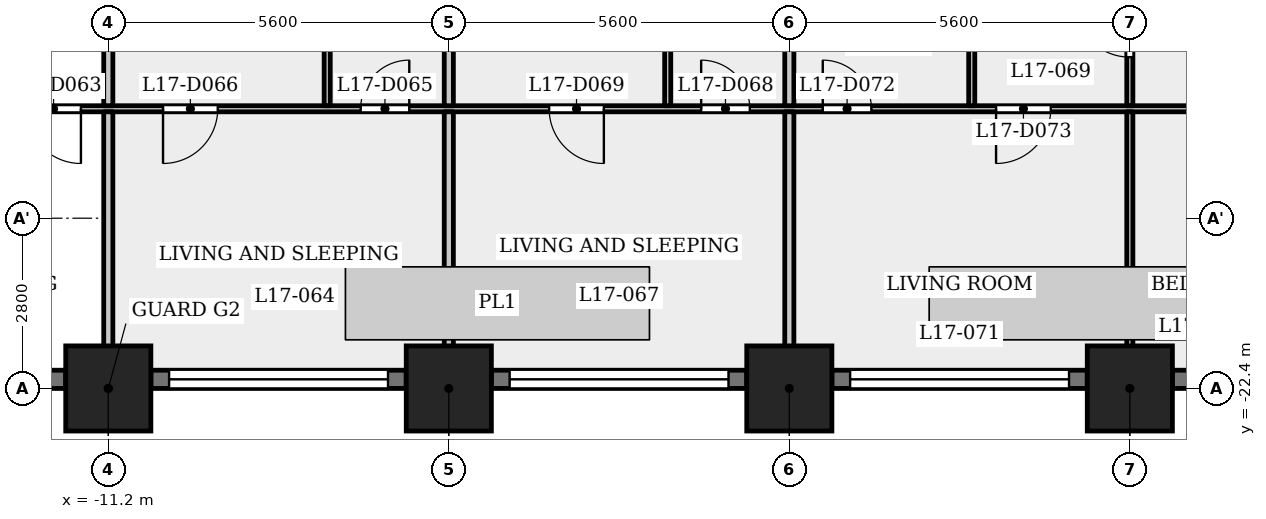
"""IFC4 building model, lengths in metres.
Left out: names, types, materials, properties, quantities, classifications, styles, units other than length and angle.
Written with IfcOpenShell. Run it as: python <this file> out.ifc"""

import sys

from ifc_helpers import new_model, si_unit, direction, frame, frame_2d, origin, origin_2d, place, context, subcontext, project, spatial, rectangle, extrude, element, fill, save


model = new_model("IFC4")
c1 = context("Model", 3, precision=1e-05, world=origin(), true_north=direction((0.0, 1.0)))
c2 = subcontext(c1, "Body", "Model", "MODEL_VIEW")
j1 = project(units=[si_unit("LENGTHUNIT", "METRE"), si_unit("PLANEANGLEUNIT", "RADIAN")], contexts=[c1])
p1 = place(None, origin())
s1 = spatial("IfcSite", under=j1, at=p1, CompositionType="ELEMENT")
p2 = place(p1, origin())
s2 = spatial("IfcBuilding", under=s1, at=p2, CompositionType="ELEMENT")
p3 = place(p2, frame((0.0, 0.0, 69.0)))
s3 = spatial("IfcBuildingStorey", under=s2, at=p3, CompositionType="ELEMENT", Elevation=69.0)
for number, where, z_axis, x_axis in (
    (1, (-11.2, -22.4, 0.0), (0.0, 0.0, 1.0), (1.0, 0.0, 0.0)),
    (2, (-5.6, -22.4, 0.0), (0.0, 0.0, 1.0), (1.0, 0.0, 0.0)),
    (3, (0.0, -22.4, 0.0), (0.0, 0.0, 1.0), (1.0, 0.0, 0.0)),
    (4, (5.6, -22.4, 0.0), (0.0, 0.0, 1.0), (1.0, 0.0, 0.0)),
):
    element("IfcColumn", number, at=place(p3, frame(where, z_axis=z_axis, x_axis=x_axis)), inside=s3, PredefinedType="COLUMN", context=c2, shape_type="SweptSolid", body=[
        extrude(rectangle(XDim=1.4, YDim=1.4, at=origin_2d()), origin(), (0.0, 0.0, 1.0), 3.5),
    ])
p4 = place(p3, frame((-16.1, -22.25, 0.0), z_axis=(0.0, 0.0, 1.0), x_axis=(1.0, 0.0, 0.0)))
e5 = element("IfcWall", 5, at=p4, inside=s3, PredefinedType="SOLIDWALL", context=c2, shape_type="SweptSolid", body=[
    extrude(rectangle(XDim=4.2, YDim=0.3, at=frame_2d((2.1, 0.0))), origin(), (0.0, 0.0, 1.0), 2.3),
])
p5 = place(p4, frame((0.3, 0.0, 1.2)))
e6 = element("IfcOpeningElement", 6, at=p5, cuts=e5, PredefinedType="OPENING", context=c2, shape_type="SweptSolid", body=[
    extrude(rectangle(XDim=3.6, YDim=0.95, at=frame_2d((1.8, 0.475))), frame((0.0, 0.16, 0.0), z_axis=(0.0, -1.0, 0.0), x_axis=(1.0, 0.0, 0.0)), (0.0, 0.0, 1.0), 0.32),
])
p6 = place(p3, frame((-10.5, -22.25, 0.0), z_axis=(0.0, 0.0, 1.0), x_axis=(1.0, 0.0, 0.0)))
e7 = element("IfcWall", 7, at=p6, inside=s3, PredefinedType="SOLIDWALL", context=c2, shape_type="SweptSolid", body=[
    extrude(rectangle(XDim=4.2, YDim=0.3, at=frame_2d((2.1, 0.0))), origin(), (0.0, 0.0, 1.0), 2.3),
])
p7 = place(p6, frame((0.3, 0.0, 1.2)))
e8 = element("IfcOpeningElement", 8, at=p7, cuts=e7, PredefinedType="OPENING", context=c2, shape_type="SweptSolid", body=[
    extrude(rectangle(XDim=3.6, YDim=0.95, at=frame_2d((1.8, 0.475))), frame((0.0, 0.16, 0.0), z_axis=(0.0, -1.0, 0.0), x_axis=(1.0, 0.0, 0.0)), (0.0, 0.0, 1.0), 0.32),
])
p8 = place(p3, frame((-4.9, -22.25, 0.0), z_axis=(0.0, 0.0, 1.0), x_axis=(1.0, 0.0, 0.0)))
e9 = element("IfcWall", 9, at=p8, inside=s3, PredefinedType="SOLIDWALL", context=c2, shape_type="SweptSolid", body=[
    extrude(rectangle(XDim=4.2, YDim=0.3, at=frame_2d((2.1, 0.0))), origin(), (0.0, 0.0, 1.0), 2.3),
])
p9 = place(p8, frame((0.3, 0.0, 1.2)))
e10 = element("IfcOpeningElement", 10, at=p9, cuts=e9, PredefinedType="OPENING", context=c2, shape_type="SweptSolid", body=[
    extrude(rectangle(XDim=3.6, YDim=0.95, at=frame_2d((1.8, 0.475))), frame((0.0, 0.16, 0.0), z_axis=(0.0, -1.0, 0.0), x_axis=(1.0, 0.0, 0.0)), (0.0, 0.0, 1.0), 0.32),
])
p10 = place(p3, frame((0.7, -22.25, 0.0), z_axis=(0.0, 0.0, 1.0), x_axis=(1.0, 0.0, 0.0)))
e11 = element("IfcWall", 11, at=p10, inside=s3, PredefinedType="SOLIDWALL", context=c2, shape_type="SweptSolid", body=[
    extrude(rectangle(XDim=4.2, YDim=0.3, at=frame_2d((2.1, 0.0))), origin(), (0.0, 0.0, 1.0), 2.3),
])
p11 = place(p10, frame((0.3, 0.0, 1.2)))
e12 = element("IfcOpeningElement", 12, at=p11, cuts=e11, PredefinedType="OPENING", context=c2, shape_type="SweptSolid", body=[
    extrude(rectangle(XDim=3.6, YDim=0.95, at=frame_2d((1.8, 0.475))), frame((0.0, 0.16, 0.0), z_axis=(0.0, -1.0, 0.0), x_axis=(1.0, 0.0, 0.0)), (0.0, 0.0, 1.0), 0.32),
])
p12 = place(p3, frame((6.3, -22.25, 0.0), z_axis=(0.0, 0.0, 1.0), x_axis=(1.0, 0.0, 0.0)))
e13 = element("IfcWall", 13, at=p12, inside=s3, PredefinedType="SOLIDWALL", context=c2, shape_type="SweptSolid", body=[
    extrude(rectangle(XDim=4.2, YDim=0.3, at=frame_2d((2.1, 0.0))), origin(), (0.0, 0.0, 1.0), 2.3),
])
p13 = place(p12, frame((0.413, 0.0, 0.6)))
e14 = element("IfcOpeningElement", 14, at=p13, cuts=e13, PredefinedType="OPENING", context=c2, shape_type="SweptSolid", body=[
    extrude(rectangle(XDim=1.2, YDim=1.55, at=frame_2d((0.6, 0.775))), frame((0.0, 0.16, 0.0), z_axis=(0.0, -1.0, 0.0), x_axis=(1.0, 0.0, 0.0)), (0.0, 0.0, 1.0), 0.32),
])
p14 = place(p12, frame((2.587, 0.0, 0.6)))
e15 = element("IfcOpeningElement", 15, at=p14, cuts=e13, PredefinedType="OPENING", context=c2, shape_type="SweptSolid", body=[
    extrude(rectangle(XDim=1.2, YDim=1.55, at=frame_2d((0.6, 0.775))), frame((0.0, 0.16, 0.0), z_axis=(0.0, -1.0, 0.0), x_axis=(1.0, 0.0, 0.0)), (0.0, 0.0, 1.0), 0.32),
])
p15 = place(p3, frame((-26.394, -17.8, 0.0), z_axis=(0.0, 0.0, 1.0), x_axis=(1.0, 0.0, 0.0)))
e16 = element("IfcWall", 16, at=p15, inside=s3, PredefinedType="PARTITIONING", context=c2, shape_type="SweptSolid", body=[
    extrude(rectangle(XDim=53.034, YDim=0.1, at=frame_2d((26.517, 0.0))), origin(), (0.0, 0.0, 1.0), 3.15),
])
p16 = place(p15, frame((0.794, 0.0, 0.0)))
e17 = element("IfcOpeningElement", 17, at=p16, cuts=e16, PredefinedType="OPENING", context=c2, shape_type="SweptSolid", body=[
    extrude(rectangle(XDim=0.8, YDim=2.1, at=frame_2d((0.4, 1.05))), frame((0.0, 0.06, 0.0), z_axis=(0.0, -1.0, 0.0), x_axis=(1.0, 0.0, 0.0)), (0.0, 0.0, 1.0), 0.12),
])
p17 = place(p15, frame((5.644, 0.0, 0.0)))
e18 = element("IfcOpeningElement", 18, at=p17, cuts=e16, PredefinedType="OPENING", context=c2, shape_type="SweptSolid", body=[
    extrude(rectangle(XDim=0.9, YDim=2.1, at=frame_2d((0.45, 1.05))), frame((0.0, 0.06, 0.0), z_axis=(0.0, -1.0, 0.0), x_axis=(1.0, 0.0, 0.0)), (0.0, 0.0, 1.0), 0.12),
])
p18 = place(p15, frame((10.494, 0.0, 0.0)))
e19 = element("IfcOpeningElement", 19, at=p18, cuts=e16, PredefinedType="OPENING", context=c2, shape_type="SweptSolid", body=[
    extrude(rectangle(XDim=0.8, YDim=2.1, at=frame_2d((0.4, 1.05))), frame((0.0, 0.06, 0.0), z_axis=(0.0, -1.0, 0.0), x_axis=(1.0, 0.0, 0.0)), (0.0, 0.0, 1.0), 0.12),
])
p19 = place(p15, frame((13.844, 0.0, 0.0)))
e20 = element("IfcOpeningElement", 20, at=p19, cuts=e16, PredefinedType="OPENING", context=c2, shape_type="SweptSolid", body=[
    extrude(rectangle(XDim=0.9, YDim=2.1, at=frame_2d((0.45, 1.05))), frame((0.0, 0.06, 0.0), z_axis=(0.0, -1.0, 0.0), x_axis=(1.0, 0.0, 0.0)), (0.0, 0.0, 1.0), 0.12),
])
p20 = place(p15, frame((19.344, 0.0, 0.0)))
e21 = element("IfcOpeningElement", 21, at=p20, cuts=e16, PredefinedType="OPENING", context=c2, shape_type="SweptSolid", body=[
    extrude(rectangle(XDim=0.8, YDim=2.1, at=frame_2d((0.4, 1.05))), frame((0.0, 0.06, 0.0), z_axis=(0.0, -1.0, 0.0), x_axis=(1.0, 0.0, 0.0)), (0.0, 0.0, 1.0), 0.12),
])
p21 = place(p15, frame((16.094, 0.0, 0.0)))
e22 = element("IfcOpeningElement", 22, at=p21, cuts=e16, PredefinedType="OPENING", context=c2, shape_type="SweptSolid", body=[
    extrude(rectangle(XDim=0.9, YDim=2.1, at=frame_2d((0.45, 1.05))), frame((0.0, 0.06, 0.0), z_axis=(0.0, -1.0, 0.0), x_axis=(1.0, 0.0, 0.0)), (0.0, 0.0, 1.0), 0.12),
])
p22 = place(p15, frame((24.944, 0.0, 0.0)))
e23 = element("IfcOpeningElement", 23, at=p22, cuts=e16, PredefinedType="OPENING", context=c2, shape_type="SweptSolid", body=[
    extrude(rectangle(XDim=0.8, YDim=2.1, at=frame_2d((0.4, 1.05))), frame((0.0, 0.06, 0.0), z_axis=(0.0, -1.0, 0.0), x_axis=(1.0, 0.0, 0.0)), (0.0, 0.0, 1.0), 0.12),
])
p23 = place(p15, frame((22.444, 0.0, 0.0)))
e24 = element("IfcOpeningElement", 24, at=p23, cuts=e16, PredefinedType="OPENING", context=c2, shape_type="SweptSolid", body=[
    extrude(rectangle(XDim=0.9, YDim=2.1, at=frame_2d((0.45, 1.05))), frame((0.0, 0.06, 0.0), z_axis=(0.0, -1.0, 0.0), x_axis=(1.0, 0.0, 0.0)), (0.0, 0.0, 1.0), 0.12),
])
p24 = place(p15, frame((26.944, 0.0, 0.0)))
e25 = element("IfcOpeningElement", 25, at=p24, cuts=e16, PredefinedType="OPENING", context=c2, shape_type="SweptSolid", body=[
    extrude(rectangle(XDim=0.8, YDim=2.1, at=frame_2d((0.4, 1.05))), frame((0.0, 0.06, 0.0), z_axis=(0.0, -1.0, 0.0), x_axis=(1.0, 0.0, 0.0)), (0.0, 0.0, 1.0), 0.12),
])
p25 = place(p15, frame((29.794, 0.0, 0.0)))
e26 = element("IfcOpeningElement", 26, at=p25, cuts=e16, PredefinedType="OPENING", context=c2, shape_type="SweptSolid", body=[
    extrude(rectangle(XDim=0.9, YDim=2.1, at=frame_2d((0.45, 1.05))), frame((0.0, 0.06, 0.0), z_axis=(0.0, -1.0, 0.0), x_axis=(1.0, 0.0, 0.0)), (0.0, 0.0, 1.0), 0.12),
])
p26 = place(p15, frame((33.394, 0.0, 0.0)))
e27 = element("IfcOpeningElement", 27, at=p26, cuts=e16, PredefinedType="OPENING", context=c2, shape_type="SweptSolid", body=[
    extrude(rectangle(XDim=0.9, YDim=2.1, at=frame_2d((0.45, 1.05))), frame((0.0, 0.06, 0.0), z_axis=(0.0, -1.0, 0.0), x_axis=(1.0, 0.0, 0.0)), (0.0, 0.0, 1.0), 0.12),
])
p27 = place(p15, frame((34.944, 0.0, 0.0)))
e28 = element("IfcOpeningElement", 28, at=p27, cuts=e16, PredefinedType="OPENING", context=c2, shape_type="SweptSolid", body=[
    extrude(rectangle(XDim=0.9, YDim=2.1, at=frame_2d((0.45, 1.05))), frame((0.0, 0.06, 0.0), z_axis=(0.0, -1.0, 0.0), x_axis=(1.0, 0.0, 0.0)), (0.0, 0.0, 1.0), 0.12),
])
p28 = place(p15, frame((38.144, 0.0, 0.0)))
e29 = element("IfcOpeningElement", 29, at=p28, cuts=e16, PredefinedType="OPENING", context=c2, shape_type="SweptSolid", body=[
    extrude(rectangle(XDim=0.8, YDim=2.1, at=frame_2d((0.4, 1.05))), frame((0.0, 0.06, 0.0), z_axis=(0.0, -1.0, 0.0), x_axis=(1.0, 0.0, 0.0)), (0.0, 0.0, 1.0), 0.12),
])
p29 = place(p15, frame((40.244, 0.0, 0.0)))
e30 = element("IfcOpeningElement", 30, at=p29, cuts=e16, PredefinedType="OPENING", context=c2, shape_type="SweptSolid", body=[
    extrude(rectangle(XDim=0.9, YDim=2.1, at=frame_2d((0.45, 1.05))), frame((0.0, 0.06, 0.0), z_axis=(0.0, -1.0, 0.0), x_axis=(1.0, 0.0, 0.0)), (0.0, 0.0, 1.0), 0.12),
])
p30 = place(p15, frame((49.362, 0.0, 0.0)))
e31 = element("IfcOpeningElement", 31, at=p30, cuts=e16, PredefinedType="OPENING", context=c2, shape_type="SweptSolid", body=[
    extrude(rectangle(XDim=0.8, YDim=2.1, at=frame_2d((0.4, 1.05))), frame((0.0, 0.06, 0.0), z_axis=(0.0, -1.0, 0.0), x_axis=(1.0, 0.0, 0.0)), (0.0, 0.0, 1.0), 0.12),
])
p31 = place(p15, frame((45.094, 0.0, 0.0)))
e32 = element("IfcOpeningElement", 32, at=p31, cuts=e16, PredefinedType="OPENING", context=c2, shape_type="SweptSolid", body=[
    extrude(rectangle(XDim=0.9, YDim=2.1, at=frame_2d((0.45, 1.05))), frame((0.0, 0.06, 0.0), z_axis=(0.0, -1.0, 0.0), x_axis=(1.0, 0.0, 0.0)), (0.0, 0.0, 1.0), 0.12),
])
p32 = place(p3, frame((-11.2, -23.08, 0.0), z_axis=(0.0, 0.0, 1.0), x_axis=(0.0, 1.0, 0.0)))
e33 = element("IfcWall", 33, at=p32, inside=s3, PredefinedType="PARTITIONING", context=c2, shape_type="SweptSolid", body=[
    extrude(rectangle(XDim=5.23, YDim=0.15, at=frame_2d((2.615, 0.0))), origin(), (0.0, 0.0, 1.0), 3.15),
])
p33 = place(p3, frame((-11.2, -17.75, 0.0), z_axis=(0.0, 0.0, 1.0), x_axis=(0.0, 1.0, 0.0)))
e34 = element("IfcWall", 34, at=p33, inside=s3, PredefinedType="PARTITIONING", context=c2, shape_type="SweptSolid", body=[
    extrude(rectangle(XDim=2.275, YDim=0.15, at=frame_2d((1.137, 0.0))), origin(), (0.0, 0.0, 1.0), 3.15),
])
p34 = place(p3, frame((-7.6, -17.75, 0.0), z_axis=(0.0, 0.0, 1.0), x_axis=(0.0, 1.0, 0.0)))
e35 = element("IfcWall", 35, at=p34, inside=s3, PredefinedType="PARTITIONING", context=c2, shape_type="SweptSolid", body=[
    extrude(rectangle(XDim=2.275, YDim=0.1, at=frame_2d((1.137, 0.0))), origin(), (0.0, 0.0, 1.0), 3.15),
])
p35 = place(p3, frame((-5.6, -23.08, 0.0), z_axis=(0.0, 0.0, 1.0), x_axis=(0.0, 1.0, 0.0)))
e36 = element("IfcWall", 36, at=p35, inside=s3, PredefinedType="PARTITIONING", context=c2, shape_type="SweptSolid", body=[
    extrude(rectangle(XDim=5.23, YDim=0.15, at=frame_2d((2.615, 0.0))), origin(), (0.0, 0.0, 1.0), 3.15),
])
p36 = place(p3, frame((-5.6, -17.75, 0.0), z_axis=(0.0, 0.0, 1.0), x_axis=(0.0, 1.0, 0.0)))
e37 = element("IfcWall", 37, at=p36, inside=s3, PredefinedType="PARTITIONING", context=c2, shape_type="SweptSolid", body=[
    extrude(rectangle(XDim=2.275, YDim=0.15, at=frame_2d((1.137, 0.0))), origin(), (0.0, 0.0, 1.0), 3.15),
])
p37 = place(p3, frame((-2.0, -17.75, 0.0), z_axis=(0.0, 0.0, 1.0), x_axis=(0.0, 1.0, 0.0)))
e38 = element("IfcWall", 38, at=p37, inside=s3, PredefinedType="PARTITIONING", context=c2, shape_type="SweptSolid", body=[
    extrude(rectangle(XDim=2.275, YDim=0.1, at=frame_2d((1.137, 0.0))), origin(), (0.0, 0.0, 1.0), 3.15),
])
p38 = place(p3, frame((0.0, -23.08, 0.0), z_axis=(0.0, 0.0, 1.0), x_axis=(0.0, 1.0, 0.0)))
e39 = element("IfcWall", 39, at=p38, inside=s3, PredefinedType="PARTITIONING", context=c2, shape_type="SweptSolid", body=[
    extrude(rectangle(XDim=5.23, YDim=0.15, at=frame_2d((2.615, 0.0))), origin(), (0.0, 0.0, 1.0), 3.15),
])
p39 = place(p3, frame((0.0, -17.75, 0.0), z_axis=(0.0, 0.0, 1.0), x_axis=(0.0, 1.0, 0.0)))
e40 = element("IfcWall", 40, at=p39, inside=s3, PredefinedType="PARTITIONING", context=c2, shape_type="SweptSolid", body=[
    extrude(rectangle(XDim=2.275, YDim=0.15, at=frame_2d((1.137, 0.0))), origin(), (0.0, 0.0, 1.0), 3.15),
])
p40 = place(p3, frame((3.0, -17.75, 0.0), z_axis=(0.0, 0.0, 1.0), x_axis=(0.0, 1.0, 0.0)))
e41 = element("IfcWall", 41, at=p40, inside=s3, PredefinedType="PARTITIONING", context=c2, shape_type="SweptSolid", body=[
    extrude(rectangle(XDim=2.275, YDim=0.1, at=frame_2d((1.137, 0.0))), origin(), (0.0, 0.0, 1.0), 3.15),
])
p41 = place(p3, frame((5.6, -23.08, 0.0), z_axis=(0.0, 0.0, 1.0), x_axis=(0.0, 1.0, 0.0)))
e42 = element("IfcWall", 42, at=p41, inside=s3, PredefinedType="PARTITIONING", context=c2, shape_type="SweptSolid", body=[
    extrude(rectangle(XDim=5.23, YDim=0.1, at=frame_2d((2.615, 0.0))), origin(), (0.0, 0.0, 1.0), 3.15),
])
p42 = place(p3, frame((5.6, -17.75, 0.0), z_axis=(0.0, 0.0, 1.0), x_axis=(0.0, 1.0, 0.0)))
e43 = element("IfcWall", 43, at=p42, inside=s3, PredefinedType="PARTITIONING", context=c2, shape_type="SweptSolid", body=[
    extrude(rectangle(XDim=2.275, YDim=0.1, at=frame_2d((1.137, 0.0))), origin(), (0.0, 0.0, 1.0), 3.15),
])
p43 = place(p42, frame((0.799, 0.0, 0.0)))
e44 = element("IfcOpeningElement", 44, at=p43, cuts=e43, PredefinedType="OPENING", context=c2, shape_type="SweptSolid", body=[
    extrude(rectangle(XDim=0.9, YDim=2.1, at=frame_2d((0.45, 1.05))), frame((0.0, 0.06, 0.0), z_axis=(0.0, -1.0, 0.0), x_axis=(1.0, 0.0, 0.0)), (0.0, 0.0, 1.0), 0.12),
])
p44 = place(p19, origin())
e45 = element("IfcDoor", 45, at=p44, inside=s3, OperationType="SINGLE_SWING_RIGHT", PredefinedType="DOOR", context=c2, shape_type="SweptSolid", body=[
    extrude(rectangle(XDim=0.9, YDim=2.1, at=frame_2d((0.45, 1.05))), frame((0.0, 0.025, 0.0), z_axis=(0.0, -1.0, 0.0), x_axis=(1.0, 0.0, 0.0)), (0.0, 0.0, 1.0), 0.05),
])
fill(e20, e45)
p45 = place(p20, origin())
e46 = element("IfcDoor", 46, at=p45, inside=s3, OperationType="SINGLE_SWING_LEFT", PredefinedType="DOOR", context=c2, shape_type="SweptSolid", body=[
    extrude(rectangle(XDim=0.8, YDim=2.1, at=frame_2d((0.4, 1.05))), frame((0.0, 0.025, 0.0), z_axis=(0.0, -1.0, 0.0), x_axis=(1.0, 0.0, 0.0)), (0.0, 0.0, 1.0), 0.05),
])
fill(e21, e46)
p46 = place(p21, origin())
e47 = element("IfcDoor", 47, at=p46, inside=s3, OperationType="SINGLE_SWING_LEFT", PredefinedType="DOOR", context=c2, shape_type="SweptSolid", body=[
    extrude(rectangle(XDim=0.9, YDim=2.1, at=frame_2d((0.45, 1.05))), frame((0.0, 0.025, 0.0), z_axis=(0.0, -1.0, 0.0), x_axis=(1.0, 0.0, 0.0)), (0.0, 0.0, 1.0), 0.05),
])
fill(e22, e47)
p47 = place(p22, origin())
e48 = element("IfcDoor", 48, at=p47, inside=s3, OperationType="SINGLE_SWING_RIGHT", PredefinedType="DOOR", context=c2, shape_type="SweptSolid", body=[
    extrude(rectangle(XDim=0.8, YDim=2.1, at=frame_2d((0.4, 1.05))), frame((0.0, 0.025, 0.0), z_axis=(0.0, -1.0, 0.0), x_axis=(1.0, 0.0, 0.0)), (0.0, 0.0, 1.0), 0.05),
])
fill(e23, e48)
p48 = place(p23, origin())
e49 = element("IfcDoor", 49, at=p48, inside=s3, OperationType="SINGLE_SWING_RIGHT", PredefinedType="DOOR", context=c2, shape_type="SweptSolid", body=[
    extrude(rectangle(XDim=0.9, YDim=2.1, at=frame_2d((0.45, 1.05))), frame((0.0, 0.025, 0.0), z_axis=(0.0, -1.0, 0.0), x_axis=(1.0, 0.0, 0.0)), (0.0, 0.0, 1.0), 0.05),
])
fill(e24, e49)
p49 = place(p43, origin())
e50 = element("IfcDoor", 50, at=p49, inside=s3, OperationType="SINGLE_SWING_LEFT", PredefinedType="DOOR", context=c2, shape_type="SweptSolid", body=[
    extrude(rectangle(XDim=0.9, YDim=2.1, at=frame_2d((0.45, 1.05))), frame((0.0, 0.025, 0.0), z_axis=(0.0, -1.0, 0.0), x_axis=(1.0, 0.0, 0.0)), (0.0, 0.0, 1.0), 0.05),
])
fill(e44, e50)
p50 = place(p24, origin())
e51 = element("IfcDoor", 51, at=p50, inside=s3, OperationType="SINGLE_SWING_RIGHT", PredefinedType="DOOR", context=c2, shape_type="SweptSolid", body=[
    extrude(rectangle(XDim=0.8, YDim=2.1, at=frame_2d((0.4, 1.05))), frame((0.0, 0.025, 0.0), z_axis=(0.0, -1.0, 0.0), x_axis=(1.0, 0.0, 0.0)), (0.0, 0.0, 1.0), 0.05),
])
fill(e25, e51)
p51 = place(p25, origin())
e52 = element("IfcDoor", 52, at=p51, inside=s3, OperationType="SINGLE_SWING_LEFT", PredefinedType="DOOR", context=c2, shape_type="SweptSolid", body=[
    extrude(rectangle(XDim=0.9, YDim=2.1, at=frame_2d((0.45, 1.05))), frame((0.0, 0.025, 0.0), z_axis=(0.0, -1.0, 0.0), x_axis=(1.0, 0.0, 0.0)), (0.0, 0.0, 1.0), 0.05),
])
fill(e26, e52)
p52 = place(p7, origin())
e53 = element("IfcWindow", 53, at=p52, inside=s3, PartitioningType="SINGLE_PANEL", PredefinedType="WINDOW", context=c2, shape_type="SweptSolid", body=[
    extrude(rectangle(XDim=3.6, YDim=0.95, at=frame_2d((1.8, 0.475))), frame((0.0, 0.03, 0.0), z_axis=(0.0, -1.0, 0.0), x_axis=(1.0, 0.0, 0.0)), (0.0, 0.0, 1.0), 0.06),
])
fill(e8, e53)
p53 = place(p9, origin())
e54 = element("IfcWindow", 54, at=p53, inside=s3, PartitioningType="SINGLE_PANEL", PredefinedType="WINDOW", context=c2, shape_type="SweptSolid", body=[
    extrude(rectangle(XDim=3.6, YDim=0.95, at=frame_2d((1.8, 0.475))), frame((0.0, 0.03, 0.0), z_axis=(0.0, -1.0, 0.0), x_axis=(1.0, 0.0, 0.0)), (0.0, 0.0, 1.0), 0.06),
])
fill(e10, e54)
p54 = place(p11, origin())
e55 = element("IfcWindow", 55, at=p54, inside=s3, PartitioningType="SINGLE_PANEL", PredefinedType="WINDOW", context=c2, shape_type="SweptSolid", body=[
    extrude(rectangle(XDim=3.6, YDim=0.95, at=frame_2d((1.8, 0.475))), frame((0.0, 0.03, 0.0), z_axis=(0.0, -1.0, 0.0), x_axis=(1.0, 0.0, 0.0)), (0.0, 0.0, 1.0), 0.06),
])
fill(e12, e55)
save(model, sys.argv[1])
